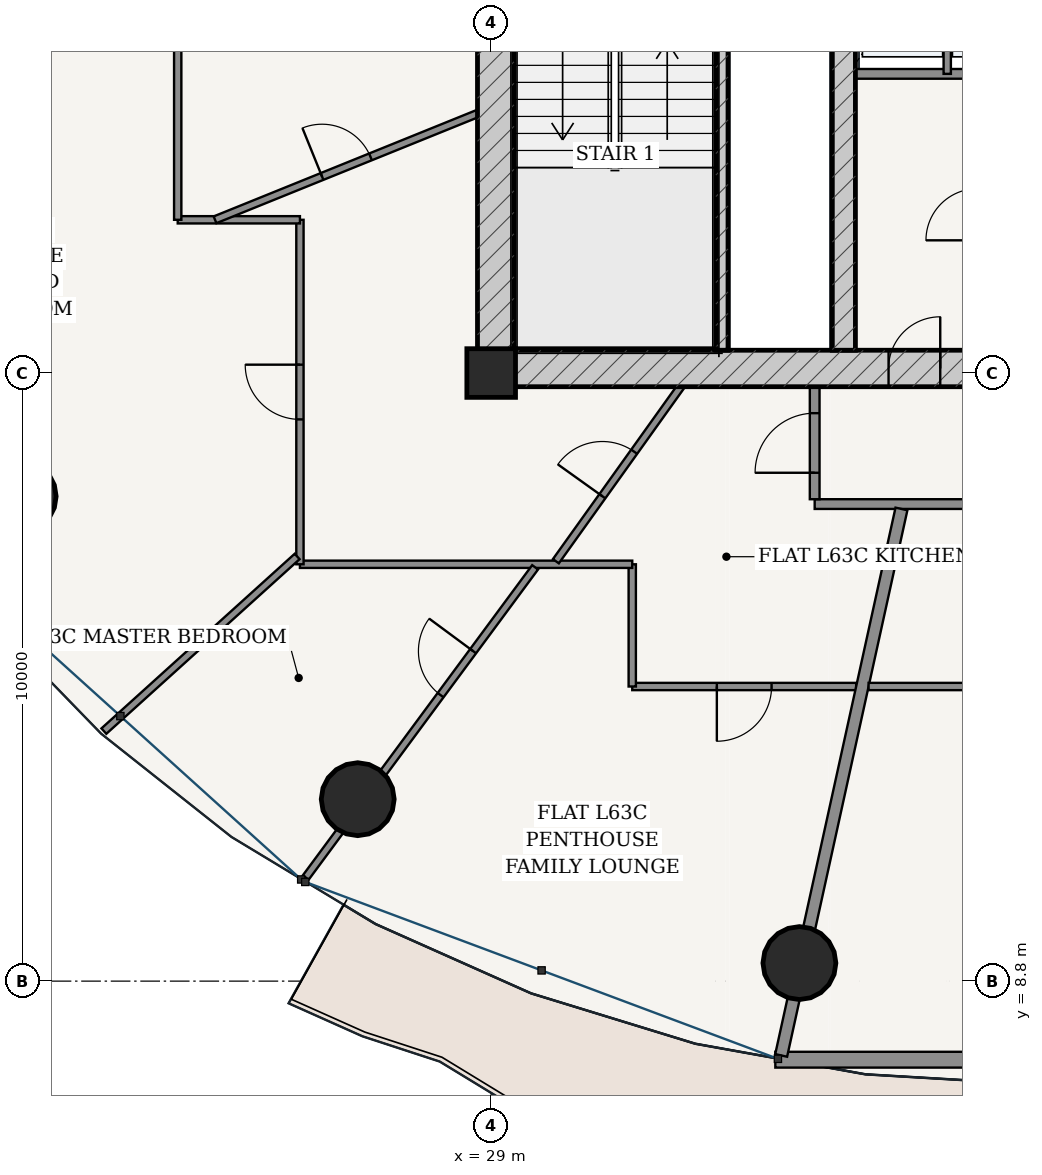
"""IFC4 building model, lengths in metres.
Left out: names, types, materials, properties, quantities, classifications, styles, units other than length and angle.
Written with IfcOpenShell. Run it as: python <this file> out.ifc"""

import sys

from ifc_helpers import new_model, si_unit, direction, frame, frame_2d, origin, origin_2d, place, context, subcontext, project, spatial, rectangle, hollow_circle, extrude, source, transform, mapped, element, fill, save


model = new_model("IFC4")
c1 = context("Model", 3, precision=1e-05, world=origin(), true_north=direction((-0.2419218956, 0.970295726276)))
c2 = subcontext(c1, "Body", "Model", "MODEL_VIEW")
j1 = project(units=[si_unit("LENGTHUNIT", "METRE"), si_unit("PLANEANGLEUNIT", "RADIAN")], contexts=[c1])
p1 = place(None, origin())
s1 = spatial("IfcSite", under=j1, at=p1, CompositionType="ELEMENT")
p2 = place(p1, origin())
s2 = spatial("IfcBuilding", under=s1, at=p2, CompositionType="ELEMENT")
p3 = place(p2, frame((0.0, 0.0, 239.3)))
s3 = spatial("IfcBuildingStorey", under=s2, at=p3, CompositionType="ELEMENT", Elevation=239.3)
p4 = place(p3, frame((29.0, 18.8, 0.0), z_axis=(0.0, 0.0, 1.0), x_axis=(1.0, 0.0, 0.0)))
e1 = element("IfcColumn", 1, at=p4, inside=s3, PredefinedType="COLUMN", context=c2, shape_type="SweptSolid", body=[
    extrude(rectangle(XDim=0.8, YDim=0.8, at=origin_2d()), origin(), (0.0, 0.0, 1.0), 3.7),
])
p5 = place(p3, frame((28.775, 18.875, 0.0), z_axis=(0.0, 0.0, 1.0), x_axis=(1.0, 0.0, 0.0)))
e2 = element("IfcWall", 2, at=p5, inside=s3, PredefinedType="SHEAR", context=c2, shape_type="SweptSolid", body=[
    extrude(rectangle(XDim=18.45, YDim=0.6, at=frame_2d((9.225, 0.0))), origin(), (0.0, 0.0, 1.0), 3.25),
])
p6 = place(p5, frame((6.76, 0.0, 0.0)))
e3 = element("IfcOpeningElement", 3, at=p6, cuts=e2, PredefinedType="OPENING", context=c2, shape_type="SweptSolid", body=[
    extrude(rectangle(XDim=0.85, YDim=2.1, at=frame_2d((0.425, 1.05))), frame((0.0, 0.31, 0.0), z_axis=(0.0, -1.0, 0.0), x_axis=(1.0, 0.0, 0.0)), (0.0, 0.0, 1.0), 0.62),
])
p7 = place(p5, frame((8.8, 0.0, 0.0)))
e4 = element("IfcOpeningElement", 4, at=p7, cuts=e2, PredefinedType="OPENING", context=c2, shape_type="SweptSolid", body=[
    extrude(rectangle(XDim=0.85, YDim=2.1, at=frame_2d((0.425, 1.05))), frame((0.0, 0.31, 0.0), z_axis=(0.0, -1.0, 0.0), x_axis=(1.0, 0.0, 0.0)), (0.0, 0.0, 1.0), 0.62),
])
p8 = place(p5, frame((10.84, 0.0, 0.0)))
e5 = element("IfcOpeningElement", 5, at=p8, cuts=e2, PredefinedType="OPENING", context=c2, shape_type="SweptSolid", body=[
    extrude(rectangle(XDim=0.85, YDim=2.1, at=frame_2d((0.425, 1.05))), frame((0.0, 0.31, 0.0), z_axis=(0.0, -1.0, 0.0), x_axis=(1.0, 0.0, 0.0)), (0.0, 0.0, 1.0), 0.62),
])
p9 = place(p3, frame((29.075, 19.175, 0.0), z_axis=(0.0, 0.0, 1.0), x_axis=(0.0, 1.0, 0.0)))
e6 = element("IfcWall", 6, at=p9, inside=s3, PredefinedType="SHEAR", context=c2, shape_type="SweptSolid", body=[
    extrude(rectangle(XDim=15.25, YDim=0.6, at=frame_2d((7.625, 0.0))), origin(), (0.0, 0.0, 1.0), 3.25),
])
p10 = place(p9, frame((9.875, 0.0, 0.0)))
e7 = element("IfcOpeningElement", 7, at=p10, cuts=e6, PredefinedType="OPENING", context=c2, shape_type="SweptSolid", body=[
    extrude(rectangle(XDim=1.5, YDim=2.2, at=frame_2d((0.75, 1.1))), frame((0.0, 0.31, 0.0), z_axis=(0.0, -1.0, 0.0), x_axis=(1.0, 0.0, 0.0)), (0.0, 0.0, 1.0), 0.62),
])
p11 = place(p3, frame((32.795, 19.175, 0.0), z_axis=(0.0, 0.0, 1.0), x_axis=(0.0, 1.0, 0.0)))
e8 = element("IfcWall", 8, at=p11, inside=s3, PredefinedType="SOLIDWALL", context=c2, shape_type="SweptSolid", body=[
    extrude(rectangle(XDim=7.375, YDim=0.2, at=frame_2d((3.688, 0.0))), origin(), (0.0, 0.0, 1.0), 3.25),
])
p12 = place(p3, frame((34.8, 19.175, 0.0), z_axis=(0.0, 0.0, 1.0), x_axis=(0.0, 1.0, 0.0)))
e9 = element("IfcWall", 9, at=p12, inside=s3, PredefinedType="SHEAR", context=c2, shape_type="SweptSolid", body=[
    extrude(rectangle(XDim=15.25, YDim=0.38, at=frame_2d((7.625, 0.0))), origin(), (0.0, 0.0, 1.0), 3.25),
])
p13 = place(p12, frame((7.8, 0.0, 0.0)))
e10 = element("IfcOpeningElement", 10, at=p13, cuts=e9, PredefinedType="OPENING", context=c2, shape_type="SweptSolid", body=[
    extrude(rectangle(XDim=1.05, YDim=2.15, at=frame_2d((0.525, 1.075))), frame((0.0, 0.2, 0.0), z_axis=(0.0, -1.0, 0.0), x_axis=(1.0, 0.0, 0.0)), (0.0, 0.0, 1.0), 0.4),
])
for number, where, z_axis, x_axis in (
    (11, (21.246, 16.772, 0.0), (0.0, 0.0, 1.0), (1.0, 0.0, 0.0)),
    (12, (26.805, 11.792, 0.0), (0.0, 0.0, 1.0), (1.0, 0.0, 0.0)),
    (13, (34.069, 9.097, 0.0), (0.0, 0.0, 1.0), (1.0, 0.0, 0.0)),
):
    element("IfcColumn", number, at=place(p3, frame(where, z_axis=z_axis, x_axis=x_axis)), inside=s3, PredefinedType="COLUMN", context=c2, shape_type="SweptSolid", body=[
        extrude(hollow_circle(Radius=0.6, WallThickness=0.038, at=origin_2d()), origin(), (0.0, 0.0, 1.0), 3.7),
    ])
p14 = place(p3, frame((33.673, 7.508, 0.0), z_axis=(0.0, 0.0, 1.0), x_axis=(1.0, 0.0, 0.0)))
e14 = element("IfcWall", 14, at=p14, inside=s3, PredefinedType="SOLIDWALL", context=c2, shape_type="SweptSolid", body=[
    extrude(rectangle(XDim=8.654, YDim=0.26, at=frame_2d((4.327, 0.0))), origin(), (0.0, 0.0, 1.0), 3.25),
])
p15 = place(p14, frame((3.652, 0.0, 0.0)))
e15 = element("IfcOpeningElement", 15, at=p15, cuts=e14, PredefinedType="OPENING", context=c2, shape_type="SweptSolid", body=[
    extrude(rectangle(XDim=1.35, YDim=2.2, at=frame_2d((0.675, 1.1))), frame((0.0, 0.14, 0.0), z_axis=(0.0, -1.0, 0.0), x_axis=(1.0, 0.0, 0.0)), (0.0, 0.0, 1.0), 0.28),
])
p16 = place(p3, frame((34.99, 23.72, 0.0), z_axis=(0.0, 0.0, 1.0), x_axis=(1.0, 0.0, 0.0)))
e16 = element("IfcWall", 16, at=p16, inside=s3, PredefinedType="PARTITIONING", context=c2, shape_type="SweptSolid", body=[
    extrude(rectangle(XDim=6.02, YDim=0.16, at=frame_2d((3.01, 0.0))), origin(), (0.0, 0.0, 1.0), 3.25),
])
p17 = place(p3, frame((36.5, 23.72, 0.0), z_axis=(0.0, 0.0, 1.0), x_axis=(0.0, 1.0, 0.0)))
e17 = element("IfcWall", 17, at=p17, inside=s3, PredefinedType="PARTITIONING", context=c2, shape_type="SweptSolid", body=[
    extrude(rectangle(XDim=2.56, YDim=0.12, at=frame_2d((1.28, 0.0))), origin(), (0.0, 0.0, 1.0), 3.25),
])
p18 = place(p3, frame((34.32, 16.645, 0.0), z_axis=(0.0, 0.0, 1.0), x_axis=(1.0, 0.0, 0.0)))
e18 = element("IfcWall", 18, at=p18, inside=s3, PredefinedType="PARTITIONING", context=c2, shape_type="SweptSolid", body=[
    extrude(rectangle(XDim=14.835, YDim=0.16, at=frame_2d((7.417, 0.0))), origin(), (0.0, 0.0, 1.0), 2.775),
])
p19 = place(p18, frame((9.928, 0.0, 0.0)))
e19 = element("IfcOpeningElement", 19, at=p19, cuts=e18, PredefinedType="OPENING", context=c2, shape_type="SweptSolid", body=[
    extrude(rectangle(XDim=0.98, YDim=2.2, at=frame_2d((0.49, 1.1))), frame((0.0, 0.09, 0.0), z_axis=(0.0, -1.0, 0.0), x_axis=(1.0, 0.0, 0.0)), (0.0, 0.0, 1.0), 0.18),
])
p20 = place(p3, frame((34.32, 16.725, 0.0), z_axis=(0.0, 0.0, 1.0), x_axis=(0.0, 1.0, 0.0)))
e20 = element("IfcWall", 20, at=p20, inside=s3, PredefinedType="PARTITIONING", context=c2, shape_type="SweptSolid", body=[
    extrude(rectangle(XDim=1.85, YDim=0.16, at=frame_2d((0.925, 0.0))), origin(), (0.0, 0.0, 1.0), 3.25),
])
p21 = place(p20, frame((0.435, 0.0, 0.0)))
e21 = element("IfcOpeningElement", 21, at=p21, cuts=e20, PredefinedType="OPENING", context=c2, shape_type="SweptSolid", body=[
    extrude(rectangle(XDim=0.98, YDim=2.2, at=frame_2d((0.49, 1.1))), frame((0.0, 0.09, 0.0), z_axis=(0.0, -1.0, 0.0), x_axis=(1.0, 0.0, 0.0)), (0.0, 0.0, 1.0), 0.18),
])
p22 = place(p3, frame((35.002, 13.645, 0.0), z_axis=(0.0, 0.0, 1.0), x_axis=(-1.0, 0.0, 0.0)))
e22 = element("IfcWall", 22, at=p22, inside=s3, PredefinedType="PARTITIONING", context=c2, shape_type="SweptSolid", body=[
    extrude(rectangle(XDim=3.682, YDim=0.12, at=frame_2d((1.841, 0.0))), origin(), (0.0, 0.0, 1.0), 3.25),
])
p23 = place(p22, frame((1.391, 0.0, 0.0)))
e23 = element("IfcOpeningElement", 23, at=p23, cuts=e22, PredefinedType="OPENING", context=c2, shape_type="SweptSolid", body=[
    extrude(rectangle(XDim=0.9, YDim=2.15, at=frame_2d((0.45, 1.075))), frame((0.0, 0.07, 0.0), z_axis=(0.0, -1.0, 0.0), x_axis=(1.0, 0.0, 0.0)), (0.0, 0.0, 1.0), 0.14),
])
p24 = place(p3, frame((31.32, 13.645, 0.0), z_axis=(0.0, 0.0, 1.0), x_axis=(0.0, 1.0, 0.0)))
e24 = element("IfcWall", 24, at=p24, inside=s3, PredefinedType="PARTITIONING", context=c2, shape_type="SweptSolid", body=[
    extrude(rectangle(XDim=2.01, YDim=0.12, at=frame_2d((1.005, 0.0))), origin(), (0.0, 0.0, 1.0), 2.969),
])
p25 = place(p3, frame((31.32, 15.655, 0.0), z_axis=(0.0, 0.0, 1.0), x_axis=(-1.0, 0.0, 0.0)))
e25 = element("IfcWall", 25, at=p25, inside=s3, PredefinedType="PARTITIONING", context=c2, shape_type="SweptSolid", body=[
    extrude(rectangle(XDim=5.465, YDim=0.12, at=frame_2d((2.732, 0.0))), origin(), (0.0, 0.0, 1.0), 2.775),
])
p26 = place(p3, frame((25.855, 15.655, 0.0), z_axis=(0.0, 0.0, 1.0), x_axis=(0.0, 1.0, 0.0)))
e26 = element("IfcWall", 26, at=p26, inside=s3, PredefinedType="PARTITIONING", context=c2, shape_type="SweptSolid", body=[
    extrude(rectangle(XDim=5.665, YDim=0.12, at=frame_2d((2.833, 0.0))), origin(), (0.0, 0.0, 1.0), 2.775),
])
p27 = place(p26, frame((2.383, 0.0, 0.0)))
e27 = element("IfcOpeningElement", 27, at=p27, cuts=e26, PredefinedType="OPENING", context=c2, shape_type="SweptSolid", body=[
    extrude(rectangle(XDim=0.9, YDim=2.15, at=frame_2d((0.45, 1.075))), frame((0.0, 0.07, 0.0), z_axis=(0.0, -1.0, 0.0), x_axis=(1.0, 0.0, 0.0)), (0.0, 0.0, 1.0), 0.14),
])
p28 = place(p3, frame((25.855, 21.32, 0.0), z_axis=(0.0, 0.0, 1.0), x_axis=(-1.0, 0.0, 0.0)))
e28 = element("IfcWall", 28, at=p28, inside=s3, PredefinedType="PARTITIONING", context=c2, shape_type="SweptSolid", body=[
    extrude(rectangle(XDim=2.01, YDim=0.12, at=frame_2d((1.005, 0.0))), origin(), (0.0, 0.0, 1.0), 2.969),
])
p29 = place(p3, frame((23.845, 21.32, 0.0), z_axis=(0.0, 0.0, 1.0), x_axis=(0.0, 1.0, 0.0)))
e29 = element("IfcWall", 29, at=p29, inside=s3, PredefinedType="PARTITIONING", context=c2, shape_type="SweptSolid", body=[
    extrude(rectangle(XDim=5.378, YDim=0.12, at=frame_2d((2.689, 0.0))), origin(), (0.0, 0.0, 1.0), 2.775),
])
p30 = place(p3, frame((25.809, 15.783, 0.0), z_axis=(0.0, 0.0, 1.0), x_axis=(-0.741938009522, -0.670468485483, 0.0)))
e30 = element("IfcWall", 30, at=p30, inside=s3, PredefinedType="PARTITIONING", context=c2, shape_type="SweptSolid", body=[
    extrude(rectangle(XDim=4.284, YDim=0.12, at=frame_2d((2.142, 0.0))), origin(), (0.0, 0.0, 1.0), 2.881),
])
p31 = place(p3, frame((29.722, 15.605, 0.0), z_axis=(0.0, 0.0, 1.0), x_axis=(-0.594518724985, -0.80408176552, 0.0)))
e31 = element("IfcWall", 31, at=p31, inside=s3, PredefinedType="PARTITIONING", context=c2, shape_type="SweptSolid", body=[
    extrude(rectangle(XDim=6.344, YDim=0.12, at=frame_2d((3.172, 0.0))), origin(), (0.0, 0.0, 1.0), 2.6),
])
p32 = place(p31, frame((1.714, 0.0, 0.0)))
e32 = element("IfcOpeningElement", 32, at=p32, cuts=e31, PredefinedType="OPENING", context=c2, shape_type="SweptSolid", body=[
    extrude(rectangle(XDim=0.9, YDim=2.15, at=frame_2d((0.45, 1.075))), frame((0.0, 0.07, 0.0), z_axis=(0.0, -1.0, 0.0), x_axis=(1.0, 0.0, 0.0)), (0.0, 0.0, 1.0), 0.14),
])
p33 = place(p3, frame((28.775, 23.067, 0.0), z_axis=(0.0, 0.0, 1.0), x_axis=(-0.926979373422, -0.375112304851, 0.0)))
e33 = element("IfcWall", 33, at=p33, inside=s3, PredefinedType="PARTITIONING", context=c2, shape_type="SweptSolid", body=[
    extrude(rectangle(XDim=4.656, YDim=0.12, at=frame_2d((2.328, 0.0))), origin(), (0.0, 0.0, 1.0), 2.969),
])
p34 = place(p33, frame((1.898, 0.0, 0.0)))
e34 = element("IfcOpeningElement", 34, at=p34, cuts=e33, PredefinedType="OPENING", context=c2, shape_type="SweptSolid", body=[
    extrude(rectangle(XDim=0.86, YDim=2.15, at=frame_2d((0.43, 1.075))), frame((0.0, 0.07, 0.0), z_axis=(0.0, -1.0, 0.0), x_axis=(1.0, 0.0, 0.0)), (0.0, 0.0, 1.0), 0.14),
])
p35 = place(p3, frame((32.117, 18.575, 0.0), z_axis=(0.0, 0.0, 1.0), x_axis=(-0.581800974427, -0.81333119094, 0.0)))
e35 = element("IfcWall", 35, at=p35, inside=s3, PredefinedType="PARTITIONING", context=c2, shape_type="SweptSolid", body=[
    extrude(rectangle(XDim=3.528, YDim=0.12, at=frame_2d((1.764, 0.0))), origin(), (0.0, 0.0, 1.0), 3.25),
])
p36 = place(p35, frame((1.314, 0.0, 0.0)))
e36 = element("IfcOpeningElement", 36, at=p36, cuts=e35, PredefinedType="OPENING", context=c2, shape_type="SweptSolid", body=[
    extrude(rectangle(XDim=0.9, YDim=2.15, at=frame_2d((0.45, 1.075))), frame((0.0, 0.07, 0.0), z_axis=(0.0, -1.0, 0.0), x_axis=(1.0, 0.0, 0.0)), (0.0, 0.0, 1.0), 0.14),
])
p37 = place(p3, frame((35.747, 16.565, 0.0), z_axis=(0.0, 0.0, 1.0), x_axis=(-0.214957946814, -0.976623305631, 0.0)))
e37 = element("IfcWall", 37, at=p37, inside=s3, PredefinedType="PARTITIONING", context=c2, shape_type="SweptSolid", body=[
    extrude(rectangle(XDim=9.202, YDim=0.2, at=frame_2d((4.601, 0.0))), origin(), (0.0, 0.0, 1.0), 2.6),
])
p38 = place(p3, frame((52.155, 13.645, 0.0), z_axis=(0.0, 0.0, 1.0), x_axis=(-1.0, 0.0, 0.0)))
e38 = element("IfcWall", 38, at=p38, inside=s3, PredefinedType="PARTITIONING", context=c2, shape_type="SweptSolid", body=[
    extrude(rectangle(XDim=16.949, YDim=0.12, at=frame_2d((8.474, 0.0))), origin(), (0.0, 0.0, 1.0), 2.775),
])
p39 = place(p38, frame((7.192, 0.0, 0.0)))
e39 = element("IfcOpeningElement", 39, at=p39, cuts=e38, PredefinedType="OPENING", context=c2, shape_type="SweptSolid", body=[
    extrude(rectangle(XDim=0.9, YDim=2.15, at=frame_2d((0.45, 1.075))), frame((0.0, 0.07, 0.0), z_axis=(0.0, -1.0, 0.0), x_axis=(1.0, 0.0, 0.0)), (0.0, 0.0, 1.0), 0.14),
])
m1 = source(origin(), c2, "Body", "SweptSolid", [
    extrude(rectangle(XDim=0.85, YDim=2.1, at=frame_2d((0.425, 1.05))), frame((0.0, 0.025, 0.0), z_axis=(0.0, -1.0, 0.0), x_axis=(1.0, 0.0, 0.0)), (0.0, 0.0, 1.0), 0.05),
])
p40 = place(p6, origin())
e40 = element("IfcDoor", 40, at=p40, inside=s3, OperationType="SINGLE_SWING_RIGHT", PredefinedType="DOOR", context=c2, shape_type="MappedRepresentation", body=[
    mapped(m1, transform((0.0, 0.0, 0.0), scale=1.0)),
])
fill(e3, e40)
m2 = source(origin(), c2, "Body", "SweptSolid", [
    extrude(rectangle(XDim=0.98, YDim=2.2, at=frame_2d((0.49, 1.1))), frame((0.0, 0.025, 0.0), z_axis=(0.0, -1.0, 0.0), x_axis=(1.0, 0.0, 0.0)), (0.0, 0.0, 1.0), 0.05),
])
p41 = place(p21, origin())
e41 = element("IfcDoor", 41, at=p41, inside=s3, OperationType="SINGLE_SWING_LEFT", PredefinedType="DOOR", context=c2, shape_type="MappedRepresentation", body=[
    mapped(m2, transform((0.0, 0.0, 0.0), scale=1.0)),
])
fill(e21, e41)
m3 = source(origin(), c2, "Body", "SweptSolid", [
    extrude(rectangle(XDim=0.9, YDim=2.15, at=frame_2d((0.45, 1.075))), frame((0.0, 0.025, 0.0), z_axis=(0.0, -1.0, 0.0), x_axis=(1.0, 0.0, 0.0)), (0.0, 0.0, 1.0), 0.05),
])
p42 = place(p23, origin())
e42 = element("IfcDoor", 42, at=p42, inside=s3, OperationType="SINGLE_SWING_RIGHT", PredefinedType="DOOR", context=c2, shape_type="MappedRepresentation", body=[
    mapped(m3, transform((0.0, 0.0, 0.0), scale=1.0)),
])
fill(e23, e42)
p43 = place(p36, frame((0.9, 0.0, 0.0), z_axis=(0.0, 0.0, 1.0), x_axis=(-1.0, 0.0, 0.0)))
e43 = element("IfcDoor", 43, at=p43, inside=s3, OperationType="SINGLE_SWING_LEFT", PredefinedType="DOOR", context=c2, shape_type="MappedRepresentation", body=[
    mapped(m3, transform((0.0, 0.0, 0.0), scale=1.0)),
])
fill(e36, e43)
p44 = place(p32, frame((0.9, 0.0, 0.0), z_axis=(0.0, 0.0, 1.0), x_axis=(-1.0, 0.0, 0.0)))
e44 = element("IfcDoor", 44, at=p44, inside=s3, OperationType="SINGLE_SWING_RIGHT", PredefinedType="DOOR", context=c2, shape_type="MappedRepresentation", body=[
    mapped(m3, transform((0.0, 0.0, 0.0), scale=1.0)),
])
fill(e32, e44)
m4 = source(origin(), c2, "Body", "SweptSolid", [
    extrude(rectangle(XDim=0.86, YDim=2.15, at=frame_2d((0.43, 1.075))), frame((0.0, 0.025, 0.0), z_axis=(0.0, -1.0, 0.0), x_axis=(1.0, 0.0, 0.0)), (0.0, 0.0, 1.0), 0.05),
])
p45 = place(p34, frame((0.86, 0.0, 0.0), z_axis=(0.0, 0.0, 1.0), x_axis=(-1.0, 0.0, 0.0)))
e45 = element("IfcDoor", 45, at=p45, inside=s3, OperationType="SINGLE_SWING_LEFT", PredefinedType="DOOR", context=c2, shape_type="MappedRepresentation", body=[
    mapped(m4, transform((0.0, 0.0, 0.0), scale=1.0)),
])
fill(e34, e45)
p46 = place(p27, origin())
e46 = element("IfcDoor", 46, at=p46, inside=s3, OperationType="SINGLE_SWING_RIGHT", PredefinedType="DOOR", context=c2, shape_type="MappedRepresentation", body=[
    mapped(m3, transform((0.0, 0.0, 0.0), scale=1.0)),
])
fill(e27, e46)
save(model, sys.argv[1])
